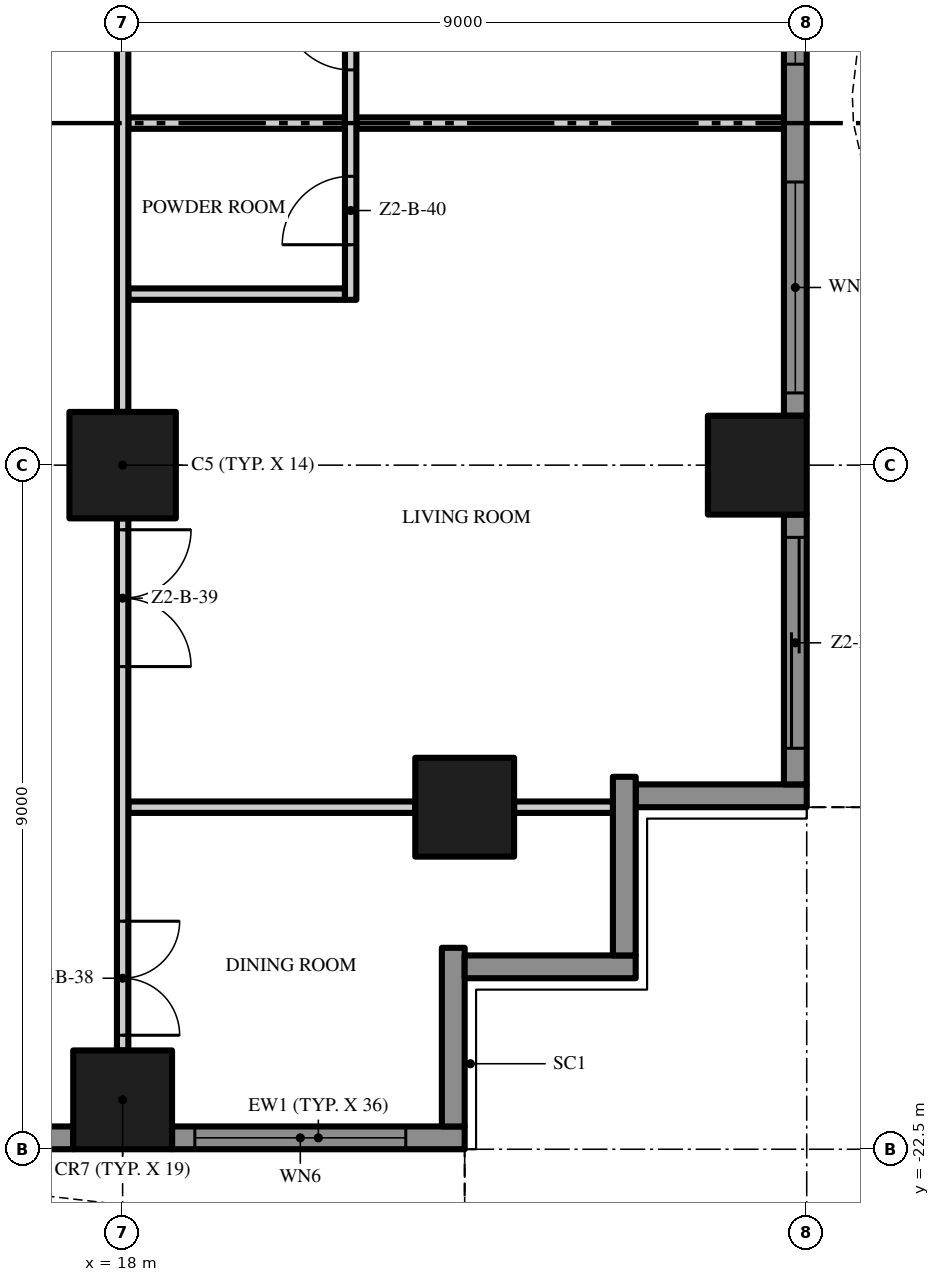
"""IFC4 building model, lengths in metres.
Left out: names, types, materials, properties, quantities, classifications, styles, units other than length and angle.
Written with IfcOpenShell. Run it as: python <this file> out.ifc"""

import sys

from ifc_helpers import new_model, si_unit, direction, frame, frame_2d, origin, origin_2d, place, context, subcontext, project, spatial, polyline, rectangle, outline, extrude, element, fill, save


model = new_model("IFC4")
c1 = context("Model", 3, precision=1e-05, world=origin(), true_north=direction((0.0, 1.0)))
c2 = subcontext(c1, "Body", "Model", "MODEL_VIEW")
j1 = project(units=[si_unit("LENGTHUNIT", "METRE"), si_unit("PLANEANGLEUNIT", "RADIAN")], contexts=[c1])
p1 = place(None, origin())
s1 = spatial("IfcSite", under=j1, at=p1, CompositionType="ELEMENT")
p2 = place(p1, origin())
s2 = spatial("IfcBuilding", under=s1, at=p2, CompositionType="ELEMENT")
p3 = place(p2, frame((0.0, 0.0, 80.8)))
s3 = spatial("IfcBuildingStorey", under=s2, at=p3, CompositionType="ELEMENT", Elevation=80.8)
p4 = place(p3, frame((18.0, -13.5, 0.0), z_axis=(0.0, 0.0, 1.0), x_axis=(1.0, 0.0, 0.0)))
e1 = element("IfcColumn", 1, at=p4, inside=s3, PredefinedType="COLUMN", context=c2, shape_type="SweptSolid", body=[
    extrude(rectangle(XDim=1.4, YDim=1.4, at=origin_2d()), origin(), (0.0, 0.0, 1.0), 3.5),
])
for number, where, z_axis, x_axis in (
    (2, (18.0, -21.85, 0.0), (0.0, 0.0, 1.0), (1.0, 0.0, 0.0)),
    (3, (26.35, -13.5, 0.0), (0.0, 0.0, 1.0), (1.0, 0.0, 0.0)),
    (4, (22.5, -18.0, 0.0), (0.0, 0.0, 1.0), (1.0, 0.0, 0.0)),
):
    element("IfcColumn", number, at=place(p3, frame(where, z_axis=z_axis, x_axis=x_axis)), inside=s3, PredefinedType="COLUMN", context=c2, shape_type="SweptSolid", body=[
        extrude(rectangle(XDim=1.3, YDim=1.3, at=origin_2d()), origin(), (0.0, 0.0, 1.0), 3.5),
    ])
p5 = place(p3, frame((17.35, -22.35, 0.0), z_axis=(0.0, 0.0, 1.0), x_axis=(-1.0, 0.0, 0.0)))
e5 = element("IfcWall", 5, at=p5, inside=s3, PredefinedType="SOLIDWALL", context=c2, shape_type="SweptSolid", body=[
    extrude(rectangle(XDim=7.7, YDim=0.3, at=frame_2d((3.85, 0.0))), origin(), (0.0, 0.0, 1.0), 3.5),
])
p6 = place(p5, frame((4.625, 0.0, 0.0)))
e6 = element("IfcOpeningElement", 6, at=p6, cuts=e5, PredefinedType="OPENING", context=c2, shape_type="SweptSolid", body=[
    extrude(rectangle(XDim=2.775, YDim=2.4, at=frame_2d((1.387, 1.2))), frame((0.0, 0.16, 0.0), z_axis=(0.0, -1.0, 0.0), x_axis=(1.0, 0.0, 0.0)), (0.0, 0.0, 1.0), 0.32),
])
p7 = place(p5, frame((0.3, 0.0, 0.45)))
e7 = element("IfcOpeningElement", 7, at=p7, cuts=e5, PredefinedType="OPENING", context=c2, shape_type="SweptSolid", body=[
    extrude(rectangle(XDim=2.775, YDim=2.65, at=frame_2d((1.387, 1.325))), frame((0.0, 0.16, 0.0), z_axis=(0.0, -1.0, 0.0), x_axis=(1.0, 0.0, 0.0)), (0.0, 0.0, 1.0), 0.32),
])
p8 = place(p3, frame((22.5, -22.35, 0.0), z_axis=(0.0, 0.0, 1.0), x_axis=(-1.0, 0.0, 0.0)))
e8 = element("IfcWall", 8, at=p8, inside=s3, PredefinedType="SOLIDWALL", context=c2, shape_type="SweptSolid", body=[
    extrude(rectangle(XDim=3.85, YDim=0.3, at=frame_2d((1.925, 0.0))), origin(), (0.0, 0.0, 1.0), 3.5),
])
p9 = place(p8, frame((0.775, 0.0, 0.45)))
e9 = element("IfcOpeningElement", 9, at=p9, cuts=e8, PredefinedType="OPENING", context=c2, shape_type="SweptSolid", body=[
    extrude(rectangle(XDim=2.775, YDim=2.65, at=frame_2d((1.387, 1.325))), frame((0.0, 0.16, 0.0), z_axis=(0.0, -1.0, 0.0), x_axis=(1.0, 0.0, 0.0)), (0.0, 0.0, 1.0), 0.32),
])
p10 = place(p3, frame((22.35, -19.85, 0.0), z_axis=(0.0, 0.0, 1.0), x_axis=(0.0, -1.0, 0.0)))
e10 = element("IfcWall", 10, at=p10, inside=s3, PredefinedType="SOLIDWALL", context=c2, shape_type="SweptSolid", body=[
    extrude(rectangle(XDim=2.35, YDim=0.3, at=frame_2d((1.175, 0.0))), origin(), (0.0, 0.0, 1.0), 3.5),
])
p11 = place(p3, frame((24.75, -20.1, 0.0), z_axis=(0.0, 0.0, 1.0), x_axis=(-1.0, 0.0, 0.0)))
e11 = element("IfcWall", 11, at=p11, inside=s3, PredefinedType="SOLIDWALL", context=c2, shape_type="SweptSolid", body=[
    extrude(rectangle(XDim=2.25, YDim=0.3, at=frame_2d((1.125, 0.0))), origin(), (0.0, 0.0, 1.0), 3.5),
])
p12 = place(p3, frame((24.6, -17.6, 0.0), z_axis=(0.0, 0.0, 1.0), x_axis=(0.0, -1.0, 0.0)))
e12 = element("IfcWall", 12, at=p12, inside=s3, PredefinedType="SOLIDWALL", context=c2, shape_type="SweptSolid", body=[
    extrude(rectangle(XDim=2.35, YDim=0.3, at=frame_2d((1.175, 0.0))), origin(), (0.0, 0.0, 1.0), 3.5),
])
p13 = place(p3, frame((27.0, -17.85, 0.0), z_axis=(0.0, 0.0, 1.0), x_axis=(-1.0, 0.0, 0.0)))
e13 = element("IfcWall", 13, at=p13, inside=s3, PredefinedType="SOLIDWALL", context=c2, shape_type="SweptSolid", body=[
    extrude(rectangle(XDim=2.25, YDim=0.3, at=frame_2d((1.125, 0.0))), origin(), (0.0, 0.0, 1.0), 3.5),
])
p14 = place(p3, frame((26.85, -14.15, 0.0), z_axis=(0.0, 0.0, 1.0), x_axis=(0.0, -1.0, 0.0)))
e14 = element("IfcWall", 14, at=p14, inside=s3, PredefinedType="SOLIDWALL", context=c2, shape_type="SweptSolid", body=[
    extrude(rectangle(XDim=3.55, YDim=0.3, at=frame_2d((1.775, 0.0))), origin(), (0.0, 0.0, 1.0), 3.5),
])
p15 = place(p14, frame((0.3, 0.0, 0.0)))
e15 = element("IfcOpeningElement", 15, at=p15, cuts=e14, PredefinedType="OPENING", context=c2, shape_type="SweptSolid", body=[
    extrude(rectangle(XDim=2.775, YDim=2.4, at=frame_2d((1.387, 1.2))), frame((0.0, 0.16, 0.0), z_axis=(0.0, -1.0, 0.0), x_axis=(1.0, 0.0, 0.0)), (0.0, 0.0, 1.0), 0.32),
])
p16 = place(p3, frame((26.85, -5.15, 0.0), z_axis=(0.0, 0.0, 1.0), x_axis=(0.0, -1.0, 0.0)))
e16 = element("IfcWall", 16, at=p16, inside=s3, PredefinedType="SOLIDWALL", context=c2, shape_type="SweptSolid", body=[
    extrude(rectangle(XDim=7.7, YDim=0.3, at=frame_2d((3.85, 0.0))), origin(), (0.0, 0.0, 1.0), 3.5),
])
p17 = place(p16, frame((4.625, 0.0, 0.45)))
e17 = element("IfcOpeningElement", 17, at=p17, cuts=e16, PredefinedType="OPENING", context=c2, shape_type="SweptSolid", body=[
    extrude(rectangle(XDim=2.775, YDim=2.65, at=frame_2d((1.387, 1.325))), frame((0.0, 0.16, 0.0), z_axis=(0.0, -1.0, 0.0), x_axis=(1.0, 0.0, 0.0)), (0.0, 0.0, 1.0), 0.32),
])
p18 = place(p16, frame((0.3, 0.0, 0.45)))
e18 = element("IfcOpeningElement", 18, at=p18, cuts=e16, PredefinedType="OPENING", context=c2, shape_type="SweptSolid", body=[
    extrude(rectangle(XDim=2.775, YDim=2.65, at=frame_2d((1.387, 1.325))), frame((0.0, 0.16, 0.0), z_axis=(0.0, -1.0, 0.0), x_axis=(1.0, 0.0, 0.0)), (0.0, 0.0, 1.0), 0.32),
])
p19 = place(p3, origin())
e19 = element("IfcWall", 19, at=p19, inside=s3, PredefinedType="USERDEFINED", context=c2, shape_type="SweptSolid", body=[
    extrude(outline(polyline([(-22.5, -25.149), (-21.0, -25.485), (-20.625, -25.5), (-19.5, -25.369), (-18.0, -24.845), (-16.5, -24.112), (-15.0, -23.451), (-13.5, -23.115), (-13.125, -23.1), (-12.0, -23.231), (-10.5, -23.755), (-9.0, -24.488), (-7.5, -25.149), (-6.0, -25.485), (-5.625, -25.5), (-4.5, -25.369), (-3.0, -24.845), (-1.5, -24.112), (0.0, -23.451), (1.5, -23.115), (1.875, -23.1), (3.0, -23.231), (4.5, -23.755), (6.0, -24.488), (7.5, -25.149), (9.0, -25.485), (9.375, -25.5), (10.5, -25.369), (12.0, -24.845), (13.5, -24.112), (15.0, -23.451), (16.5, -23.115), (16.875, -23.1), (18.0, -23.231), (19.5, -23.755), (21.0, -24.488), (22.5, -25.149), (22.601, -24.92), (21.105, -24.261), (19.596, -23.524), (18.056, -22.986), (16.885, -22.849), (16.467, -22.866), (14.921, -23.213), (13.395, -23.885), (11.904, -24.614), (10.444, -25.124), (9.365, -25.249), (9.033, -25.236), (7.579, -24.91), (6.105, -24.261), (4.596, -23.524), (3.056, -22.986), (1.885, -22.849), (1.467, -22.866), (-0.079, -23.213), (-1.605, -23.885), (-3.096, -24.614), (-4.556, -25.124), (-5.635, -25.249), (-5.967, -25.236), (-7.421, -24.91), (-8.895, -24.261), (-10.404, -23.524), (-11.944, -22.986), (-13.115, -22.849), (-13.533, -22.866), (-15.079, -23.213), (-16.605, -23.885), (-18.096, -24.614), (-19.556, -25.124), (-20.635, -25.249), (-20.967, -25.236), (-22.445, -24.905), (-22.5, -25.149)])), origin(), (0.0, 0.0, 1.0), 0.9),
])
p20 = place(p3, origin())
e20 = element("IfcWall", 20, at=p20, inside=s3, PredefinedType="USERDEFINED", context=c2, shape_type="SweptSolid", body=[
    extrude(outline(polyline([(29.649, -18.0), (29.985, -16.5), (30.0, -16.125), (29.869, -15.0), (29.345, -13.5), (28.612, -12.0), (27.951, -10.5), (27.615, -9.0), (27.6, -8.625), (27.731, -7.5), (28.255, -6.0), (28.988, -4.5), (29.649, -3.0), (29.985, -1.5), (30.0, -1.125), (29.869, 0.0), (29.345, 1.5), (28.612, 3.0), (27.951, 4.5), (27.615, 6.0), (27.6, 6.375), (27.731, 7.5), (28.255, 9.0), (28.988, 10.5), (29.649, 12.0), (29.985, 13.5), (30.0, 13.875), (29.869, 15.0), (29.345, 16.5), (28.612, 18.0), (28.388, 17.89), (29.114, 16.404), (29.624, 14.944), (29.749, 13.865), (29.736, 13.533), (29.41, 12.079), (28.761, 10.605), (28.024, 9.096), (27.486, 7.556), (27.349, 6.385), (27.366, 5.967), (27.713, 4.421), (28.385, 2.895), (29.114, 1.404), (29.624, -0.056), (29.749, -1.135), (29.736, -1.467), (29.41, -2.921), (28.761, -4.395), (28.024, -5.904), (27.486, -7.444), (27.349, -8.615), (27.366, -9.033), (27.713, -10.579), (28.385, -12.105), (29.114, -13.596), (29.624, -15.056), (29.749, -16.135), (29.736, -16.467), (29.405, -17.945), (29.649, -18.0)])), origin(), (0.0, 0.0, 1.0), 0.9),
])
p21 = place(p3, frame((18.075, -18.0, 0.0), z_axis=(0.0, 0.0, 1.0), x_axis=(1.0, 0.0, 0.0)))
e21 = element("IfcWall", 21, at=p21, inside=s3, PredefinedType="PARTITIONING", context=c2, shape_type="SweptSolid", body=[
    extrude(rectangle(XDim=3.775, YDim=0.15, at=frame_2d((1.887, 0.0))), origin(), (0.0, 0.0, 1.0), 3.5),
])
p22 = place(p3, frame((23.15, -18.0, 0.0), z_axis=(0.0, 0.0, 1.0), x_axis=(1.0, 0.0, 0.0)))
e22 = element("IfcWall", 22, at=p22, inside=s3, PredefinedType="PARTITIONING", context=c2, shape_type="SweptSolid", body=[
    extrude(rectangle(XDim=1.3, YDim=0.15, at=frame_2d((0.65, 0.0))), origin(), (0.0, 0.0, 1.0), 3.5),
])
for number, where, z_axis, x_axis in (
    (23, (18.075, -11.25, 0.0), (0.0, 0.0, 1.0), (1.0, 0.0, 0.0)),
    (24, (18.075, -9.0, 0.0), (0.0, 0.0, 1.0), (1.0, 0.0, 0.0)),
):
    element("IfcWall", number, at=place(p3, frame(where, z_axis=z_axis, x_axis=x_axis)), inside=s3, PredefinedType="PARTITIONING", context=c2, shape_type="SweptSolid", body=[
        extrude(rectangle(XDim=2.85, YDim=0.15, at=frame_2d((1.425, 0.0))), origin(), (0.0, 0.0, 1.0), 3.5),
    ])
p23 = place(p3, frame((21.075, -9.0, 0.0), z_axis=(0.0, 0.0, 1.0), x_axis=(1.0, 0.0, 0.0)))
e25 = element("IfcWall", 25, at=p23, inside=s3, PredefinedType="PARTITIONING", context=c2, shape_type="SweptSolid", body=[
    extrude(rectangle(XDim=5.625, YDim=0.15, at=frame_2d((2.812, 0.0))), origin(), (0.0, 0.0, 1.0), 3.5),
])
p24 = place(p3, frame((18.0, -14.2, 0.0), z_axis=(0.0, 0.0, 1.0), x_axis=(0.0, -1.0, 0.0)))
e26 = element("IfcWall", 26, at=p24, inside=s3, PredefinedType="PARTITIONING", context=c2, shape_type="SweptSolid", body=[
    extrude(rectangle(XDim=7.0, YDim=0.15, at=frame_2d((3.5, 0.0))), origin(), (0.0, 0.0, 1.0), 3.5),
])
p25 = place(p24, frame((5.3, 0.0, 0.0)))
e27 = element("IfcOpeningElement", 27, at=p25, cuts=e26, PredefinedType="OPENING", context=c2, shape_type="SweptSolid", body=[
    extrude(rectangle(XDim=1.5, YDim=2.4, at=frame_2d((0.75, 1.2))), frame((0.0, 0.085, 0.0), z_axis=(0.0, -1.0, 0.0), x_axis=(1.0, 0.0, 0.0)), (0.0, 0.0, 1.0), 0.17),
])
p26 = place(p24, frame((0.15, 0.0, 0.0)))
e28 = element("IfcOpeningElement", 28, at=p26, cuts=e26, PredefinedType="OPENING", context=c2, shape_type="SweptSolid", body=[
    extrude(rectangle(XDim=1.8, YDim=2.4, at=frame_2d((0.9, 1.2))), frame((0.0, 0.085, 0.0), z_axis=(0.0, -1.0, 0.0), x_axis=(1.0, 0.0, 0.0)), (0.0, 0.0, 1.0), 0.17),
])
p27 = place(p3, frame((18.0, -5.2, 0.0), z_axis=(0.0, 0.0, 1.0), x_axis=(0.0, -1.0, 0.0)))
e29 = element("IfcWall", 29, at=p27, inside=s3, PredefinedType="PARTITIONING", context=c2, shape_type="SweptSolid", body=[
    extrude(rectangle(XDim=7.6, YDim=0.15, at=frame_2d((3.8, 0.0))), origin(), (0.0, 0.0, 1.0), 3.5),
])
p28 = place(p27, frame((0.15, 0.0, 0.0)))
e30 = element("IfcOpeningElement", 30, at=p28, cuts=e29, PredefinedType="OPENING", context=c2, shape_type="SweptSolid", body=[
    extrude(rectangle(XDim=1.0, YDim=2.4, at=frame_2d((0.5, 1.2))), frame((0.0, 0.085, 0.0), z_axis=(0.0, -1.0, 0.0), x_axis=(1.0, 0.0, 0.0)), (0.0, 0.0, 1.0), 0.17),
])
p29 = place(p3, frame((21.0, -11.325, 0.0), z_axis=(0.0, 0.0, 1.0), x_axis=(0.0, 1.0, 0.0)))
e31 = element("IfcWall", 31, at=p29, inside=s3, PredefinedType="PARTITIONING", context=c2, shape_type="SweptSolid", body=[
    extrude(rectangle(XDim=4.65, YDim=0.15, at=frame_2d((2.325, 0.0))), origin(), (0.0, 0.0, 1.0), 3.5),
])
p30 = place(p29, frame((0.725, 0.0, 0.0)))
e32 = element("IfcOpeningElement", 32, at=p30, cuts=e31, PredefinedType="OPENING", context=c2, shape_type="SweptSolid", body=[
    extrude(rectangle(XDim=0.9, YDim=2.1, at=frame_2d((0.45, 1.05))), frame((0.0, 0.085, 0.0), z_axis=(0.0, -1.0, 0.0), x_axis=(1.0, 0.0, 0.0)), (0.0, 0.0, 1.0), 0.17),
])
p31 = place(p29, frame((3.025, 0.0, 0.0)))
e33 = element("IfcOpeningElement", 33, at=p31, cuts=e31, PredefinedType="OPENING", context=c2, shape_type="SweptSolid", body=[
    extrude(rectangle(XDim=0.9, YDim=2.1, at=frame_2d((0.45, 1.05))), frame((0.0, 0.085, 0.0), z_axis=(0.0, -1.0, 0.0), x_axis=(1.0, 0.0, 0.0)), (0.0, 0.0, 1.0), 0.17),
])
p32 = place(p9, origin())
e34 = element("IfcWindow", 34, at=p32, inside=s3, PartitioningType="SINGLE_PANEL", PredefinedType="WINDOW", context=c2, shape_type="SweptSolid", body=[
    extrude(rectangle(XDim=2.775, YDim=2.65, at=frame_2d((1.387, 1.325))), frame((0.0, 0.03, 0.0), z_axis=(0.0, -1.0, 0.0), x_axis=(1.0, 0.0, 0.0)), (0.0, 0.0, 1.0), 0.06),
])
fill(e9, e34)
p33 = place(p15, origin())
e35 = element("IfcDoor", 35, at=p33, inside=s3, OperationType="SINGLE_SWING_LEFT", PredefinedType="DOOR", context=c2, shape_type="SweptSolid", body=[
    extrude(rectangle(XDim=2.775, YDim=2.4, at=frame_2d((1.387, 1.2))), frame((0.0, 0.025, 0.0), z_axis=(0.0, -1.0, 0.0), x_axis=(1.0, 0.0, 0.0)), (0.0, 0.0, 1.0), 0.05),
])
fill(e15, e35)
p34 = place(p17, origin())
e36 = element("IfcWindow", 36, at=p34, inside=s3, PartitioningType="SINGLE_PANEL", PredefinedType="WINDOW", context=c2, shape_type="SweptSolid", body=[
    extrude(rectangle(XDim=2.775, YDim=2.65, at=frame_2d((1.387, 1.325))), frame((0.0, 0.03, 0.0), z_axis=(0.0, -1.0, 0.0), x_axis=(1.0, 0.0, 0.0)), (0.0, 0.0, 1.0), 0.06),
])
fill(e17, e36)
p35 = place(p18, origin())
e37 = element("IfcWindow", 37, at=p35, inside=s3, PartitioningType="SINGLE_PANEL", PredefinedType="WINDOW", context=c2, shape_type="SweptSolid", body=[
    extrude(rectangle(XDim=2.775, YDim=2.65, at=frame_2d((1.387, 1.325))), frame((0.0, 0.03, 0.0), z_axis=(0.0, -1.0, 0.0), x_axis=(1.0, 0.0, 0.0)), (0.0, 0.0, 1.0), 0.06),
])
fill(e18, e37)
p36 = place(p25, origin())
e38 = element("IfcDoor", 38, at=p36, inside=s3, OperationType="DOUBLE_DOOR_SINGLE_SWING", PredefinedType="DOOR", context=c2, shape_type="SweptSolid", body=[
    extrude(rectangle(XDim=1.5, YDim=2.4, at=frame_2d((0.75, 1.2))), frame((0.0, 0.025, 0.0), z_axis=(0.0, -1.0, 0.0), x_axis=(1.0, 0.0, 0.0)), (0.0, 0.0, 1.0), 0.05),
])
fill(e27, e38)
p37 = place(p26, origin())
e39 = element("IfcDoor", 39, at=p37, inside=s3, OperationType="DOUBLE_DOOR_SINGLE_SWING", PredefinedType="DOOR", context=c2, shape_type="SweptSolid", body=[
    extrude(rectangle(XDim=1.8, YDim=2.4, at=frame_2d((0.9, 1.2))), frame((0.0, 0.025, 0.0), z_axis=(0.0, -1.0, 0.0), x_axis=(1.0, 0.0, 0.0)), (0.0, 0.0, 1.0), 0.05),
])
fill(e28, e39)
p38 = place(p30, origin())
e40 = element("IfcDoor", 40, at=p38, inside=s3, OperationType="SINGLE_SWING_LEFT", PredefinedType="DOOR", context=c2, shape_type="SweptSolid", body=[
    extrude(rectangle(XDim=0.9, YDim=2.1, at=frame_2d((0.45, 1.05))), frame((0.0, 0.025, 0.0), z_axis=(0.0, -1.0, 0.0), x_axis=(1.0, 0.0, 0.0)), (0.0, 0.0, 1.0), 0.05),
])
fill(e32, e40)
p39 = place(p31, origin())
e41 = element("IfcDoor", 41, at=p39, inside=s3, OperationType="SINGLE_SWING_RIGHT", PredefinedType="DOOR", context=c2, shape_type="SweptSolid", body=[
    extrude(rectangle(XDim=0.9, YDim=2.1, at=frame_2d((0.45, 1.05))), frame((0.0, 0.025, 0.0), z_axis=(0.0, -1.0, 0.0), x_axis=(1.0, 0.0, 0.0)), (0.0, 0.0, 1.0), 0.05),
])
fill(e33, e41)
save(model, sys.argv[1])
